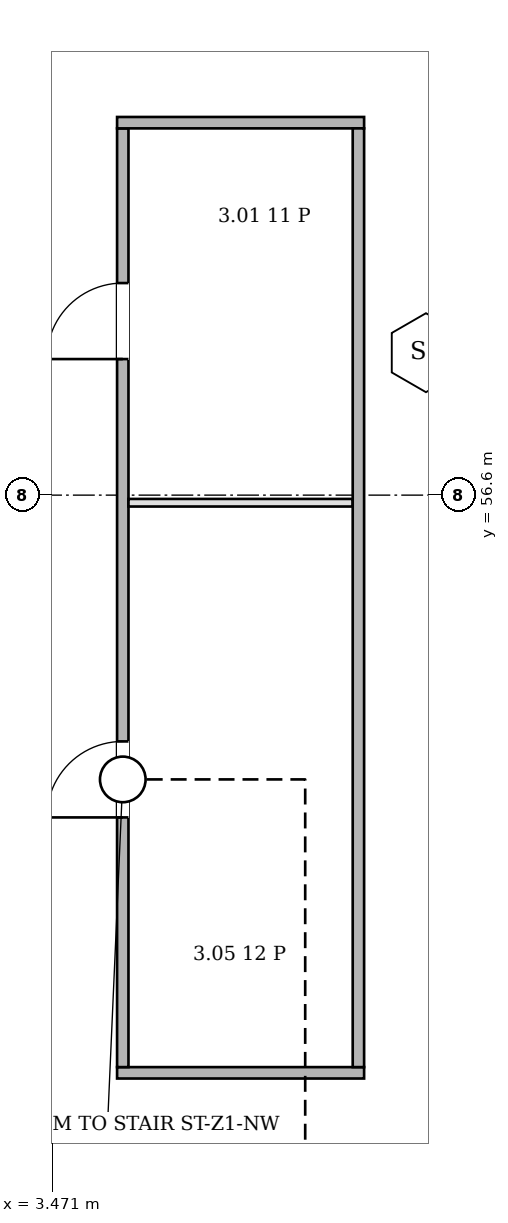
"""IFC4 building model, lengths in metres.
Left out: names, types, materials, properties, quantities, classifications, styles, units other than length and angle.
Written with IfcOpenShell. Run it as: python <this file> out.ifc"""

import sys

from ifc_helpers import new_model, si_unit, direction, frame, frame_2d, origin, place, context, subcontext, project, spatial, rectangle, extrude, element, fill, save


model = new_model("IFC4")
c1 = context("Model", 3, precision=1e-05, world=origin(), true_north=direction((0.0, 1.0)))
c2 = subcontext(c1, "Body", "Model", "MODEL_VIEW")
j1 = project(units=[si_unit("LENGTHUNIT", "METRE"), si_unit("PLANEANGLEUNIT", "RADIAN")], contexts=[c1])
p1 = place(None, origin())
s1 = spatial("IfcSite", under=j1, at=p1, CompositionType="ELEMENT")
p2 = place(p1, origin())
s2 = spatial("IfcBuilding", under=s1, at=p2, CompositionType="ELEMENT")
p3 = place(p2, frame((0.0, 0.0, 21.7)))
s3 = spatial("IfcBuildingStorey", under=s2, at=p3, CompositionType="ELEMENT", Elevation=21.7)
p4 = place(p3, frame((4.325, 49.0, 0.0), z_axis=(0.0, 0.0, 1.0), x_axis=(1.0, 0.0, 0.0)))
e1 = element("IfcWall", 1, at=p4, inside=s3, PredefinedType="PARTITIONING", context=c2, shape_type="SweptSolid", body=[
    extrude(rectangle(XDim=3.25, YDim=0.15, at=frame_2d((1.625, 0.0))), origin(), (0.0, 0.0, 1.0), 4.65),
])
p5 = place(p3, frame((4.4, 49.075, 0.0), z_axis=(0.0, 0.0, 1.0), x_axis=(0.0, 1.0, 0.0)))
e2 = element("IfcWall", 2, at=p5, inside=s3, PredefinedType="PARTITIONING", context=c2, shape_type="SweptSolid", body=[
    extrude(rectangle(XDim=12.35, YDim=0.15, at=frame_2d((6.175, 0.0))), origin(), (0.0, 0.0, 1.0), 4.65),
])
p6 = place(p5, frame((3.285, 0.0, 0.0)))
e3 = element("IfcOpeningElement", 3, at=p6, cuts=e2, PredefinedType="OPENING", context=c2, shape_type="SweptSolid", body=[
    extrude(rectangle(XDim=1.0, YDim=2.1, at=frame_2d((0.5, 1.05))), frame((0.0, 0.085, 0.0), z_axis=(0.0, -1.0, 0.0), x_axis=(1.0, 0.0, 0.0)), (0.0, 0.0, 1.0), 0.17),
])
p7 = place(p5, frame((9.315, 0.0, 0.0)))
e4 = element("IfcOpeningElement", 4, at=p7, cuts=e2, PredefinedType="OPENING", context=c2, shape_type="SweptSolid", body=[
    extrude(rectangle(XDim=1.0, YDim=2.1, at=frame_2d((0.5, 1.05))), frame((0.0, 0.085, 0.0), z_axis=(0.0, -1.0, 0.0), x_axis=(1.0, 0.0, 0.0)), (0.0, 0.0, 1.0), 0.17),
])
p8 = place(p3, frame((4.325, 61.5, 0.0), z_axis=(0.0, 0.0, 1.0), x_axis=(1.0, 0.0, 0.0)))
e5 = element("IfcWall", 5, at=p8, inside=s3, PredefinedType="PARTITIONING", context=c2, shape_type="SweptSolid", body=[
    extrude(rectangle(XDim=3.25, YDim=0.15, at=frame_2d((1.625, 0.0))), origin(), (0.0, 0.0, 1.0), 4.65),
])
p9 = place(p3, frame((4.475, 56.5, 0.0), z_axis=(0.0, 0.0, 1.0), x_axis=(1.0, 0.0, 0.0)))
e6 = element("IfcWall", 6, at=p9, inside=s3, PredefinedType="PARTITIONING", context=c2, shape_type="SweptSolid", body=[
    extrude(rectangle(XDim=2.95, YDim=0.1, at=frame_2d((1.475, 0.0))), origin(), (0.0, 0.0, 1.0), 4.25),
])
p10 = place(p3, frame((7.5, 49.075, 0.0), z_axis=(0.0, 0.0, 1.0), x_axis=(0.0, 1.0, 0.0)))
e7 = element("IfcWall", 7, at=p10, inside=s3, PredefinedType="PARTITIONING", context=c2, shape_type="SweptSolid", body=[
    extrude(rectangle(XDim=12.35, YDim=0.15, at=frame_2d((6.175, 0.0))), origin(), (0.0, 0.0, 1.0), 4.65),
])
p11 = place(p6, origin())
e8 = element("IfcDoor", 8, at=p11, inside=s3, OperationType="SINGLE_SWING_RIGHT", PredefinedType="DOOR", context=c2, shape_type="SweptSolid", body=[
    extrude(rectangle(XDim=1.0, YDim=2.1, at=frame_2d((0.5, 1.05))), frame((0.0, 0.025, 0.0), z_axis=(0.0, -1.0, 0.0), x_axis=(1.0, 0.0, 0.0)), (0.0, 0.0, 1.0), 0.05),
])
fill(e3, e8)
p12 = place(p7, origin())
e9 = element("IfcDoor", 9, at=p12, inside=s3, OperationType="SINGLE_SWING_LEFT", PredefinedType="DOOR", context=c2, shape_type="SweptSolid", body=[
    extrude(rectangle(XDim=1.0, YDim=2.1, at=frame_2d((0.5, 1.05))), frame((0.0, 0.025, 0.0), z_axis=(0.0, -1.0, 0.0), x_axis=(1.0, 0.0, 0.0)), (0.0, 0.0, 1.0), 0.05),
])
fill(e4, e9)
save(model, sys.argv[1])
